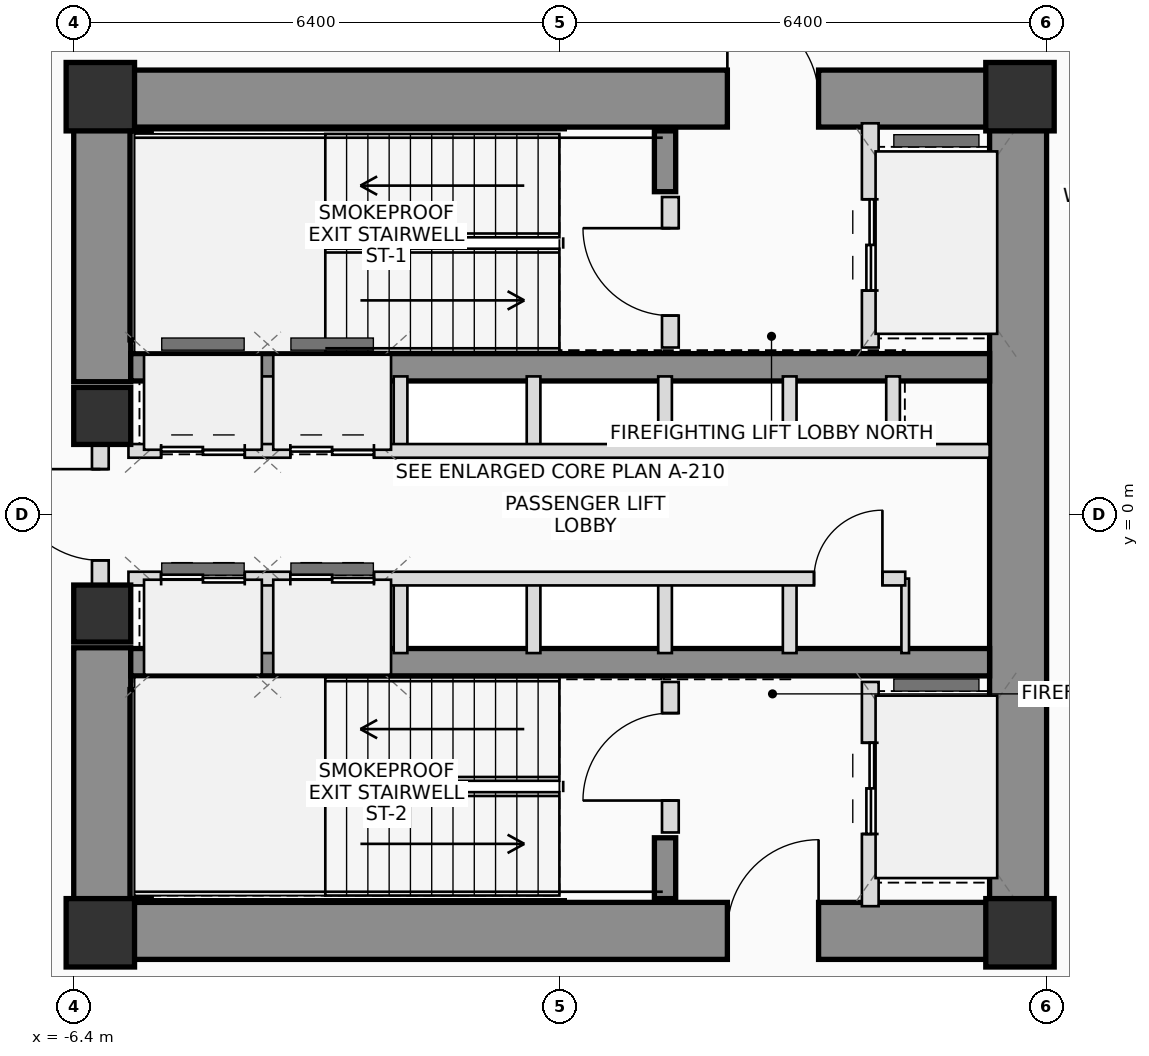
"""IFC4 building model, lengths in metres.
Left out: names, types, materials, properties, quantities, classifications, styles, units other than length and angle.
Written with IfcOpenShell. Run it as: python <this file> out.ifc"""

import sys

from ifc_helpers import new_model, si_unit, direction, frame, frame_2d, origin, origin_2d, place, context, subcontext, project, spatial, rectangle, extrude, source, transform, mapped, element, fill, save


model = new_model("IFC4")
c1 = context("Model", 3, precision=1e-05, world=origin(), true_north=direction((0.0, 1.0)))
c2 = subcontext(c1, "Body", "Model", "MODEL_VIEW")
j1 = project(units=[si_unit("LENGTHUNIT", "METRE"), si_unit("PLANEANGLEUNIT", "RADIAN")], contexts=[c1])
p1 = place(None, origin())
s1 = spatial("IfcSite", under=j1, at=p1, CompositionType="ELEMENT")
p2 = place(p1, origin())
s2 = spatial("IfcBuilding", under=s1, at=p2, CompositionType="ELEMENT")
p3 = place(p2, frame((0.0, 0.0, 112.4)))
s3 = spatial("IfcBuildingStorey", under=s2, at=p3, CompositionType="ELEMENT", Elevation=112.4)
m1 = source(origin(), c2, "Body", "SweptSolid", [
    extrude(rectangle(XDim=0.9, YDim=0.9, at=origin_2d()), origin(), (0.0, 0.0, 1.0), 3.75),
])
for number, where, z_axis, x_axis in (
    (1, (-6.05, -5.5, 0.0), (0.0, 0.0, 1.0), (1.0, 0.0, 0.0)),
    (2, (6.05, -5.5, 0.0), (0.0, 0.0, 1.0), (1.0, 0.0, 0.0)),
    (3, (6.05, 5.5, 0.0), (0.0, 0.0, 1.0), (1.0, 0.0, 0.0)),
    (4, (-6.05, 5.5, 0.0), (0.0, 0.0, 1.0), (1.0, 0.0, 0.0)),
):
    element("IfcColumn", number, at=place(p3, frame(where, z_axis=z_axis, x_axis=x_axis)), inside=s3, PredefinedType="COLUMN", context=c2, shape_type="MappedRepresentation", body=[
        mapped(m1, transform((0.0, 0.0, 0.0), scale=1.0)),
    ])
p4 = place(p3, frame((-6.4, 5.475, 0.0), z_axis=(0.0, 0.0, 1.0), x_axis=(1.0, 0.0, 0.0)))
e5 = element("IfcWall", 5, at=p4, inside=s3, PredefinedType="SHEAR", context=c2, shape_type="SweptSolid", body=[
    extrude(rectangle(XDim=12.8, YDim=0.75, at=frame_2d((6.4, 0.0))), origin(), (0.0, 0.0, 1.0), 3.75),
])
p5 = place(p4, frame((8.6, 0.0, 0.0)))
e6 = element("IfcOpeningElement", 6, at=p5, cuts=e5, PredefinedType="OPENING", context=c2, shape_type="SweptSolid", body=[
    extrude(rectangle(XDim=1.2, YDim=2.2, at=frame_2d((0.6, 1.1))), frame((0.0, 0.385, 0.0), z_axis=(0.0, -1.0, 0.0), x_axis=(1.0, 0.0, 0.0)), (0.0, 0.0, 1.0), 0.77),
])
p6 = place(p3, frame((-6.4, -5.475, 0.0), z_axis=(0.0, 0.0, 1.0), x_axis=(1.0, 0.0, 0.0)))
e7 = element("IfcWall", 7, at=p6, inside=s3, PredefinedType="SHEAR", context=c2, shape_type="SweptSolid", body=[
    extrude(rectangle(XDim=12.8, YDim=0.75, at=frame_2d((6.4, 0.0))), origin(), (0.0, 0.0, 1.0), 3.75),
])
p7 = place(p6, frame((8.6, 0.0, 0.0)))
e8 = element("IfcOpeningElement", 8, at=p7, cuts=e7, PredefinedType="OPENING", context=c2, shape_type="SweptSolid", body=[
    extrude(rectangle(XDim=1.2, YDim=2.2, at=frame_2d((0.6, 1.1))), frame((0.0, 0.385, 0.0), z_axis=(0.0, -1.0, 0.0), x_axis=(1.0, 0.0, 0.0)), (0.0, 0.0, 1.0), 0.77),
])
p8 = place(p3, frame((6.025, -5.1, 0.0), z_axis=(0.0, 0.0, 1.0), x_axis=(0.0, 1.0, 0.0)))
e9 = element("IfcWall", 9, at=p8, inside=s3, PredefinedType="SHEAR", context=c2, shape_type="SweptSolid", body=[
    extrude(rectangle(XDim=10.2, YDim=0.75, at=frame_2d((5.1, 0.0))), origin(), (0.0, 0.0, 1.0), 3.75),
])
for number, where, z_axis, x_axis in (
    (10, (-6.025, -5.1, 0.0), (0.0, 0.0, 1.0), (0.0, 1.0, 0.0)),
    (11, (-6.025, 1.75, 0.0), (0.0, 0.0, 1.0), (0.0, 1.0, 0.0)),
):
    element("IfcWall", number, at=place(p3, frame(where, z_axis=z_axis, x_axis=x_axis)), inside=s3, PredefinedType="SHEAR", context=c2, shape_type="SweptSolid", body=[
        extrude(rectangle(XDim=3.35, YDim=0.75, at=frame_2d((1.675, 0.0))), origin(), (0.0, 0.0, 1.0), 3.75),
    ])
for number, where, z_axis, x_axis in (
    (12, (-5.65, 1.94, 0.0), (0.0, 0.0, 1.0), (1.0, 0.0, 0.0)),
    (13, (-5.65, -1.94, 0.0), (0.0, 0.0, 1.0), (1.0, 0.0, 0.0)),
):
    element("IfcWall", number, at=place(p3, frame(where, z_axis=z_axis, x_axis=x_axis)), inside=s3, PredefinedType="SHEAR", context=c2, shape_type="SweptSolid", body=[
        extrude(rectangle(XDim=11.3, YDim=0.36, at=frame_2d((5.65, 0.0))), origin(), (0.0, 0.0, 1.0), 3.75),
    ])
p9 = place(p3, frame((-5.52, 2.3, 0.0), z_axis=(0.0, 0.0, 1.0), x_axis=(0.0, 1.0, 0.0)))
e14 = element("IfcWall", 14, at=p9, inside=s3, PredefinedType="SHEAR", context=c2, shape_type="SweptSolid", body=[
    extrude(rectangle(XDim=2.75, YDim=0.28, at=frame_2d((1.375, 0.0))), origin(), (0.0, 0.0, 1.0), 3.75),
])
p10 = place(p3, frame((1.38, 4.25, 0.0), z_axis=(0.0, 0.0, 1.0), x_axis=(0.0, 1.0, 0.0)))
e15 = element("IfcWall", 15, at=p10, inside=s3, PredefinedType="SHEAR", context=c2, shape_type="SweptSolid", body=[
    extrude(rectangle(XDim=0.8, YDim=0.28, at=frame_2d((0.4, 0.0))), origin(), (0.0, 0.0, 1.0), 3.75),
])
p11 = place(p3, frame((-5.52, -5.05, 0.0), z_axis=(0.0, 0.0, 1.0), x_axis=(0.0, 1.0, 0.0)))
e16 = element("IfcWall", 16, at=p11, inside=s3, PredefinedType="SHEAR", context=c2, shape_type="SweptSolid", body=[
    extrude(rectangle(XDim=2.75, YDim=0.28, at=frame_2d((1.375, 0.0))), origin(), (0.0, 0.0, 1.0), 3.75),
])
p12 = place(p3, frame((1.38, -5.05, 0.0), z_axis=(0.0, 0.0, 1.0), x_axis=(0.0, 1.0, 0.0)))
e17 = element("IfcWall", 17, at=p12, inside=s3, PredefinedType="SHEAR", context=c2, shape_type="SweptSolid", body=[
    extrude(rectangle(XDim=0.8, YDim=0.28, at=frame_2d((0.4, 0.0))), origin(), (0.0, 0.0, 1.0), 3.75),
])
m2 = source(origin(), c2, "Body", "SweptSolid", [
    extrude(rectangle(XDim=0.75, YDim=0.75, at=origin_2d()), origin(), (0.0, 0.0, 1.0), 3.75),
])
for number, where, z_axis, x_axis in (
    (18, (-6.025, -1.3, 0.0), (0.0, 0.0, 1.0), (1.0, 0.0, 0.0)),
    (19, (-6.025, 1.3, 0.0), (0.0, 0.0, 1.0), (1.0, 0.0, 0.0)),
):
    element("IfcColumn", number, at=place(p3, frame(where, z_axis=z_axis, x_axis=x_axis)), inside=s3, PredefinedType="COLUMN", context=c2, shape_type="MappedRepresentation", body=[
        mapped(m2, transform((0.0, 0.0, 0.0), scale=1.0)),
    ])
p13 = place(p3, frame((-6.05, -0.95, 0.0), z_axis=(0.0, 0.0, 1.0), x_axis=(0.0, 1.0, 0.0)))
e20 = element("IfcWall", 20, at=p13, inside=s3, PredefinedType="PLUMBINGWALL", context=c2, shape_type="SweptSolid", body=[
    extrude(rectangle(XDim=1.9, YDim=0.22, at=frame_2d((0.95, 0.0))), origin(), (0.0, 0.0, 1.0), 2.525),
])
p14 = place(p13, frame((0.35, 0.0, 0.0)))
e21 = element("IfcOpeningElement", 21, at=p14, cuts=e20, PredefinedType="OPENING", context=c2, shape_type="SweptSolid", body=[
    extrude(rectangle(XDim=1.2, YDim=2.2, at=frame_2d((0.6, 1.1))), frame((0.0, 0.12, 0.0), z_axis=(0.0, -1.0, 0.0), x_axis=(1.0, 0.0, 0.0)), (0.0, 0.0, 1.0), 0.24),
])
p15 = place(p3, frame((1.45, 2.2, 0.0), z_axis=(0.0, 0.0, 1.0), x_axis=(0.0, 1.0, 0.0)))
e22 = element("IfcWall", 22, at=p15, inside=s3, PredefinedType="PLUMBINGWALL", context=c2, shape_type="SweptSolid", body=[
    extrude(rectangle(XDim=1.98, YDim=0.22, at=frame_2d((0.99, 0.0))), origin(), (0.0, 0.0, 1.0), 3.545),
])
p16 = place(p15, frame((0.42, 0.0, 0.0)))
e23 = element("IfcOpeningElement", 23, at=p16, cuts=e22, PredefinedType="OPENING", context=c2, shape_type="SweptSolid", body=[
    extrude(rectangle(XDim=1.15, YDim=2.15, at=frame_2d((0.575, 1.075))), frame((0.0, 0.12, 0.0), z_axis=(0.0, -1.0, 0.0), x_axis=(1.0, 0.0, 0.0)), (0.0, 0.0, 1.0), 0.24),
])
p17 = place(p3, frame((4.08, 2.2, 0.0), z_axis=(0.0, 0.0, 1.0), x_axis=(0.0, 1.0, 0.0)))
e24 = element("IfcWall", 24, at=p17, inside=s3, PredefinedType="PLUMBINGWALL", context=c2, shape_type="SweptSolid", body=[
    extrude(rectangle(XDim=2.95, YDim=0.22, at=frame_2d((1.475, 0.0))), origin(), (0.0, 0.0, 1.0), 3.545),
])
p18 = place(p17, frame((0.75, 0.0, 0.0)))
e25 = element("IfcOpeningElement", 25, at=p18, cuts=e24, PredefinedType="OPENING", context=c2, shape_type="SweptSolid", body=[
    extrude(rectangle(XDim=1.2, YDim=2.25, at=frame_2d((0.6, 1.125))), frame((0.0, 0.12, 0.0), z_axis=(0.0, -1.0, 0.0), x_axis=(1.0, 0.0, 0.0)), (0.0, 0.0, 1.0), 0.24),
])
p19 = place(p3, frame((1.45, -4.18, 0.0), z_axis=(0.0, 0.0, 1.0), x_axis=(0.0, 1.0, 0.0)))
e26 = element("IfcWall", 26, at=p19, inside=s3, PredefinedType="PLUMBINGWALL", context=c2, shape_type="SweptSolid", body=[
    extrude(rectangle(XDim=1.98, YDim=0.22, at=frame_2d((0.99, 0.0))), origin(), (0.0, 0.0, 1.0), 3.545),
])
p20 = place(p19, frame((0.42, 0.0, 0.0)))
e27 = element("IfcOpeningElement", 27, at=p20, cuts=e26, PredefinedType="OPENING", context=c2, shape_type="SweptSolid", body=[
    extrude(rectangle(XDim=1.15, YDim=2.15, at=frame_2d((0.575, 1.075))), frame((0.0, 0.12, 0.0), z_axis=(0.0, -1.0, 0.0), x_axis=(1.0, 0.0, 0.0)), (0.0, 0.0, 1.0), 0.24),
])
p21 = place(p3, frame((4.08, -5.15, 0.0), z_axis=(0.0, 0.0, 1.0), x_axis=(0.0, 1.0, 0.0)))
e28 = element("IfcWall", 28, at=p21, inside=s3, PredefinedType="PLUMBINGWALL", context=c2, shape_type="SweptSolid", body=[
    extrude(rectangle(XDim=2.95, YDim=0.22, at=frame_2d((1.475, 0.0))), origin(), (0.0, 0.0, 1.0), 3.545),
])
p22 = place(p21, frame((0.95, 0.0, 0.0)))
e29 = element("IfcOpeningElement", 29, at=p22, cuts=e28, PredefinedType="OPENING", context=c2, shape_type="SweptSolid", body=[
    extrude(rectangle(XDim=1.2, YDim=2.25, at=frame_2d((0.6, 1.125))), frame((0.0, 0.12, 0.0), z_axis=(0.0, -1.0, 0.0), x_axis=(1.0, 0.0, 0.0)), (0.0, 0.0, 1.0), 0.24),
])
for number, where, z_axis, x_axis in (
    (30, (-3.85, 0.84, 0.0), (0.0, 0.0, 1.0), (0.0, 1.0, 0.0)),
    (31, (-3.85, -1.82, 0.0), (0.0, 0.0, 1.0), (0.0, 1.0, 0.0)),
    (32, (-2.1, 0.84, 0.0), (0.0, 0.0, 1.0), (0.0, 1.0, 0.0)),
    (33, (-2.1, -1.82, 0.0), (0.0, 0.0, 1.0), (0.0, 1.0, 0.0)),
    (34, (-0.35, 0.84, 0.0), (0.0, 0.0, 1.0), (0.0, 1.0, 0.0)),
    (35, (-0.35, -1.82, 0.0), (0.0, 0.0, 1.0), (0.0, 1.0, 0.0)),
    (36, (1.38, 0.84, 0.0), (0.0, 0.0, 1.0), (0.0, 1.0, 0.0)),
    (37, (1.38, -1.82, 0.0), (0.0, 0.0, 1.0), (0.0, 1.0, 0.0)),
    (38, (3.02, 0.84, 0.0), (0.0, 0.0, 1.0), (0.0, 1.0, 0.0)),
    (39, (4.38, 0.84, 0.0), (0.0, 0.0, 1.0), (0.0, 1.0, 0.0)),
    (40, (3.02, -1.82, 0.0), (0.0, 0.0, 1.0), (0.0, 1.0, 0.0)),
):
    element("IfcWall", number, at=place(p3, frame(where, z_axis=z_axis, x_axis=x_axis)), inside=s3, PredefinedType="PLUMBINGWALL", context=c2, shape_type="SweptSolid", body=[
        extrude(rectangle(XDim=0.98, YDim=0.18, at=frame_2d((0.49, 0.0))), origin(), (0.0, 0.0, 1.0), 3.545),
    ])
p23 = place(p3, frame((4.54, -1.82, 0.0), z_axis=(0.0, 0.0, 1.0), x_axis=(0.0, 1.0, 0.0)))
e41 = element("IfcWall", 41, at=p23, inside=s3, PredefinedType="PARTITIONING", context=c2, shape_type="SweptSolid", body=[
    extrude(rectangle(XDim=0.98, YDim=0.1, at=frame_2d((0.49, 0.0))), origin(), (0.0, 0.0, 1.0), 3.545),
])
p24 = place(p3, frame((-5.68, 0.84, 0.0), z_axis=(0.0, 0.0, 1.0), x_axis=(1.0, 0.0, 0.0)))
e42 = element("IfcWall", 42, at=p24, inside=s3, PredefinedType="PLUMBINGWALL", context=c2, shape_type="SweptSolid", body=[
    extrude(rectangle(XDim=11.33, YDim=0.18, at=frame_2d((5.665, 0.0))), origin(), (0.0, 0.0, 1.0), 3.545),
])
p25 = place(p24, frame((0.43, 0.0, 0.0)))
e43 = element("IfcOpeningElement", 43, at=p25, cuts=e42, PredefinedType="OPENING", context=c2, shape_type="SweptSolid", body=[
    extrude(rectangle(XDim=1.1, YDim=2.2, at=frame_2d((0.55, 1.1))), frame((0.0, 0.1, 0.0), z_axis=(0.0, -1.0, 0.0), x_axis=(1.0, 0.0, 0.0)), (0.0, 0.0, 1.0), 0.2),
])
p26 = place(p24, frame((2.13, 0.0, 0.0)))
e44 = element("IfcOpeningElement", 44, at=p26, cuts=e42, PredefinedType="OPENING", context=c2, shape_type="SweptSolid", body=[
    extrude(rectangle(XDim=1.1, YDim=2.2, at=frame_2d((0.55, 1.1))), frame((0.0, 0.1, 0.0), z_axis=(0.0, -1.0, 0.0), x_axis=(1.0, 0.0, 0.0)), (0.0, 0.0, 1.0), 0.2),
])
p27 = place(p3, frame((-5.68, -0.84, 0.0), z_axis=(0.0, 0.0, 1.0), x_axis=(1.0, 0.0, 0.0)))
e45 = element("IfcWall", 45, at=p27, inside=s3, PredefinedType="PLUMBINGWALL", context=c2, shape_type="SweptSolid", body=[
    extrude(rectangle(XDim=10.22, YDim=0.18, at=frame_2d((5.11, 0.0))), origin(), (0.0, 0.0, 1.0), 3.545),
])
p28 = place(p27, frame((0.43, 0.0, 0.0)))
e46 = element("IfcOpeningElement", 46, at=p28, cuts=e45, PredefinedType="OPENING", context=c2, shape_type="SweptSolid", body=[
    extrude(rectangle(XDim=1.1, YDim=2.2, at=frame_2d((0.55, 1.1))), frame((0.0, 0.1, 0.0), z_axis=(0.0, -1.0, 0.0), x_axis=(1.0, 0.0, 0.0)), (0.0, 0.0, 1.0), 0.2),
])
p29 = place(p27, frame((2.13, 0.0, 0.0)))
e47 = element("IfcOpeningElement", 47, at=p29, cuts=e45, PredefinedType="OPENING", context=c2, shape_type="SweptSolid", body=[
    extrude(rectangle(XDim=1.1, YDim=2.2, at=frame_2d((0.55, 1.1))), frame((0.0, 0.1, 0.0), z_axis=(0.0, -1.0, 0.0), x_axis=(1.0, 0.0, 0.0)), (0.0, 0.0, 1.0), 0.2),
])
p30 = place(p27, frame((9.02, 0.0, 0.0)))
e48 = element("IfcOpeningElement", 48, at=p30, cuts=e45, PredefinedType="OPENING", context=c2, shape_type="SweptSolid", body=[
    extrude(rectangle(XDim=0.9, YDim=2.05, at=frame_2d((0.45, 1.025))), frame((0.0, 0.1, 0.0), z_axis=(0.0, -1.0, 0.0), x_axis=(1.0, 0.0, 0.0)), (0.0, 0.0, 1.0), 0.2),
])
p31 = place(p3, frame((8.15, -6.099, 0.0), z_axis=(0.0, 0.0, 1.0), x_axis=(-0.725854359245, -0.687848420196, 0.0)))
e49 = element("IfcWall", 49, at=p31, inside=s3, PredefinedType="PARTITIONING", context=c2, shape_type="SweptSolid", body=[
    extrude(rectangle(XDim=2.479, YDim=0.16, at=frame_2d((1.24, 0.0))), origin(), (0.0, 0.0, 1.0), 2.85),
])
p32 = place(p5, origin())
e50 = element("IfcDoor", 50, at=p32, inside=s3, OperationType="SINGLE_SWING_LEFT", PredefinedType="DOOR", context=c2, shape_type="SweptSolid", body=[
    extrude(rectangle(XDim=1.2, YDim=2.2, at=frame_2d((0.6, 1.1))), frame((0.0, 0.025, 0.0), z_axis=(0.0, -1.0, 0.0), x_axis=(1.0, 0.0, 0.0)), (0.0, 0.0, 1.0), 0.05),
])
fill(e6, e50)
p33 = place(p7, origin())
e51 = element("IfcDoor", 51, at=p33, inside=s3, OperationType="SINGLE_SWING_RIGHT", PredefinedType="DOOR", context=c2, shape_type="SweptSolid", body=[
    extrude(rectangle(XDim=1.2, YDim=2.2, at=frame_2d((0.6, 1.1))), frame((0.0, 0.025, 0.0), z_axis=(0.0, -1.0, 0.0), x_axis=(1.0, 0.0, 0.0)), (0.0, 0.0, 1.0), 0.05),
])
fill(e8, e51)
p34 = place(p14, origin())
e52 = element("IfcDoor", 52, at=p34, inside=s3, OperationType="SINGLE_SWING_RIGHT", PredefinedType="DOOR", context=c2, shape_type="SweptSolid", body=[
    extrude(rectangle(XDim=1.2, YDim=2.2, at=frame_2d((0.6, 1.1))), frame((0.0, 0.025, 0.0), z_axis=(0.0, -1.0, 0.0), x_axis=(1.0, 0.0, 0.0)), (0.0, 0.0, 1.0), 0.05),
])
fill(e21, e52)
p35 = place(p16, origin())
e53 = element("IfcDoor", 53, at=p35, inside=s3, OperationType="SINGLE_SWING_RIGHT", PredefinedType="DOOR", context=c2, shape_type="SweptSolid", body=[
    extrude(rectangle(XDim=1.15, YDim=2.15, at=frame_2d((0.575, 1.075))), frame((0.0, 0.025, 0.0), z_axis=(0.0, -1.0, 0.0), x_axis=(1.0, 0.0, 0.0)), (0.0, 0.0, 1.0), 0.05),
])
fill(e23, e53)
p36 = place(p18, origin())
e54 = element("IfcDoor", 54, at=p36, inside=s3, OperationType="DOUBLE_DOOR_SLIDING", PredefinedType="DOOR", context=c2, shape_type="SweptSolid", body=[
    extrude(rectangle(XDim=1.2, YDim=2.25, at=frame_2d((0.6, 1.125))), frame((0.0, 0.025, 0.0), z_axis=(0.0, -1.0, 0.0), x_axis=(1.0, 0.0, 0.0)), (0.0, 0.0, 1.0), 0.05),
])
fill(e25, e54)
p37 = place(p20, origin())
e55 = element("IfcDoor", 55, at=p37, inside=s3, OperationType="SINGLE_SWING_LEFT", PredefinedType="DOOR", context=c2, shape_type="SweptSolid", body=[
    extrude(rectangle(XDim=1.15, YDim=2.15, at=frame_2d((0.575, 1.075))), frame((0.0, 0.025, 0.0), z_axis=(0.0, -1.0, 0.0), x_axis=(1.0, 0.0, 0.0)), (0.0, 0.0, 1.0), 0.05),
])
fill(e27, e55)
p38 = place(p22, origin())
e56 = element("IfcDoor", 56, at=p38, inside=s3, OperationType="DOUBLE_DOOR_SLIDING", PredefinedType="DOOR", context=c2, shape_type="SweptSolid", body=[
    extrude(rectangle(XDim=1.2, YDim=2.25, at=frame_2d((0.6, 1.125))), frame((0.0, 0.025, 0.0), z_axis=(0.0, -1.0, 0.0), x_axis=(1.0, 0.0, 0.0)), (0.0, 0.0, 1.0), 0.05),
])
fill(e29, e56)
p39 = place(p25, origin())
e57 = element("IfcDoor", 57, at=p39, inside=s3, OperationType="DOUBLE_DOOR_SLIDING", PredefinedType="DOOR", context=c2, shape_type="SweptSolid", body=[
    extrude(rectangle(XDim=1.1, YDim=2.2, at=frame_2d((0.55, 1.1))), frame((0.0, 0.025, 0.0), z_axis=(0.0, -1.0, 0.0), x_axis=(1.0, 0.0, 0.0)), (0.0, 0.0, 1.0), 0.05),
])
fill(e43, e57)
p40 = place(p26, origin())
e58 = element("IfcDoor", 58, at=p40, inside=s3, OperationType="DOUBLE_DOOR_SLIDING", PredefinedType="DOOR", context=c2, shape_type="SweptSolid", body=[
    extrude(rectangle(XDim=1.1, YDim=2.2, at=frame_2d((0.55, 1.1))), frame((0.0, 0.025, 0.0), z_axis=(0.0, -1.0, 0.0), x_axis=(1.0, 0.0, 0.0)), (0.0, 0.0, 1.0), 0.05),
])
fill(e44, e58)
p41 = place(p28, origin())
e59 = element("IfcDoor", 59, at=p41, inside=s3, OperationType="DOUBLE_DOOR_SLIDING", PredefinedType="DOOR", context=c2, shape_type="SweptSolid", body=[
    extrude(rectangle(XDim=1.1, YDim=2.2, at=frame_2d((0.55, 1.1))), frame((0.0, 0.025, 0.0), z_axis=(0.0, -1.0, 0.0), x_axis=(1.0, 0.0, 0.0)), (0.0, 0.0, 1.0), 0.05),
])
fill(e46, e59)
p42 = place(p29, origin())
e60 = element("IfcDoor", 60, at=p42, inside=s3, OperationType="DOUBLE_DOOR_SLIDING", PredefinedType="DOOR", context=c2, shape_type="SweptSolid", body=[
    extrude(rectangle(XDim=1.1, YDim=2.2, at=frame_2d((0.55, 1.1))), frame((0.0, 0.025, 0.0), z_axis=(0.0, -1.0, 0.0), x_axis=(1.0, 0.0, 0.0)), (0.0, 0.0, 1.0), 0.05),
])
fill(e47, e60)
p43 = place(p30, origin())
e61 = element("IfcDoor", 61, at=p43, inside=s3, OperationType="SINGLE_SWING_RIGHT", PredefinedType="DOOR", context=c2, shape_type="SweptSolid", body=[
    extrude(rectangle(XDim=0.9, YDim=2.05, at=frame_2d((0.45, 1.025))), frame((0.0, 0.025, 0.0), z_axis=(0.0, -1.0, 0.0), x_axis=(1.0, 0.0, 0.0)), (0.0, 0.0, 1.0), 0.05),
])
fill(e48, e61)
save(model, sys.argv[1])
